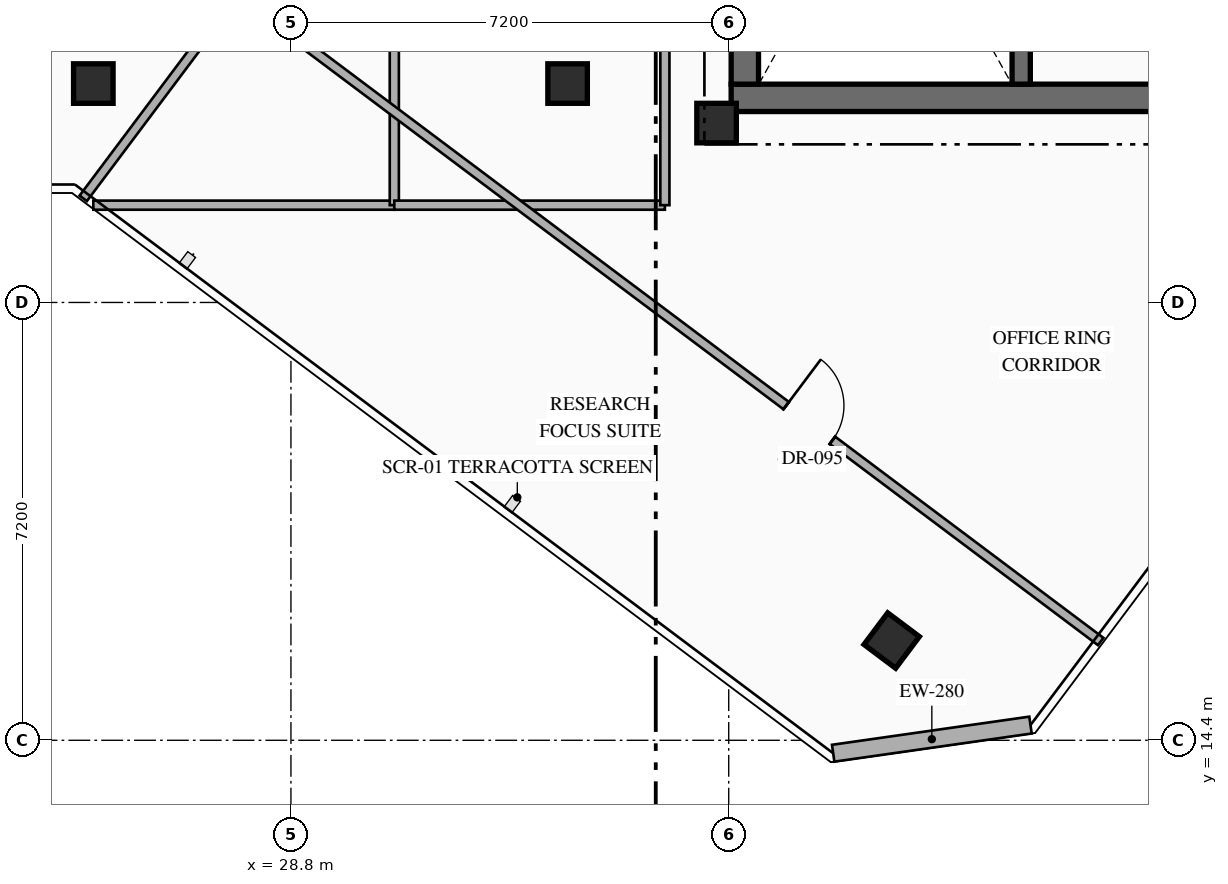
"""IFC4 building model, lengths in metres.
Left out: names, types, materials, properties, quantities, classifications, styles, units other than length and angle.
Written with IfcOpenShell. Run it as: python <this file> out.ifc"""

import sys

from ifc_helpers import new_model, si_unit, direction, frame, frame_2d, origin, origin_2d, place, context, subcontext, project, spatial, rectangle, hollow_rectangle, extrude, element, fill, save


model = new_model("IFC4")
c1 = context("Model", 3, precision=1e-05, world=origin(), true_north=direction((0.0, 1.0)))
c2 = subcontext(c1, "Body", "Model", "MODEL_VIEW")
j1 = project(units=[si_unit("LENGTHUNIT", "METRE"), si_unit("PLANEANGLEUNIT", "RADIAN")], contexts=[c1])
p1 = place(None, origin())
s1 = spatial("IfcSite", under=j1, at=p1, CompositionType="ELEMENT")
p2 = place(p1, origin())
s2 = spatial("IfcBuilding", under=s1, at=p2, CompositionType="ELEMENT")
p3 = place(p2, frame((0.0, 0.0, 253.95)))
s3 = spatial("IfcBuildingStorey", under=s2, at=p3, CompositionType="ELEMENT", Elevation=253.95)
p4 = place(p3, frame((36.04, 24.965, 0.0), z_axis=(0.0, 0.0, 1.0), x_axis=(1.0, 0.0, 0.0)))
e1 = element("IfcWall", 1, at=p4, inside=s3, PredefinedType="SHEAR", context=c2, shape_type="SweptSolid", body=[
    extrude(rectangle(XDim=7.46, YDim=0.45, at=frame_2d((3.73, 0.0))), origin(), (0.0, 0.0, 1.0), 3.6),
])
p5 = place(p3, frame((36.265, 25.19, 0.0), z_axis=(0.0, 0.0, 1.0), x_axis=(0.0, 1.0, 0.0)))
e2 = element("IfcWall", 2, at=p5, inside=s3, PredefinedType="SHEAR", context=c2, shape_type="SweptSolid", body=[
    extrude(rectangle(XDim=9.48, YDim=0.45, at=frame_2d((4.74, 0.0))), origin(), (0.0, 0.0, 1.0), 3.6),
])
p6 = place(p3, frame((40.81, 25.19, 0.0), z_axis=(0.0, 0.0, 1.0), x_axis=(0.0, 1.0, 0.0)))
e3 = element("IfcWall", 3, at=p6, inside=s3, PredefinedType="SHEAR", context=c2, shape_type="SweptSolid", body=[
    extrude(rectangle(XDim=9.48, YDim=0.3, at=frame_2d((4.74, 0.0))), origin(), (0.0, 0.0, 1.0), 3.6),
])
for number, where, z_axis, x_axis in (
    (4, (35.8, 24.55, 0.0), (0.0, 0.0, 1.0), (1.0, 0.0, 0.0)),
    (5, (25.55, 25.2, 0.0), (0.0, 0.0, 1.0), (1.0, 0.0, 0.0)),
    (6, (33.35, 25.2, 0.0), (0.0, 0.0, 1.0), (1.0, 0.0, 0.0)),
    (7, (38.68, 16.04, 0.0), (0.0, 0.0, 1.0), (0.8, -0.6, 0.0)),
):
    element("IfcColumn", number, at=place(p3, frame(where, z_axis=z_axis, x_axis=x_axis)), inside=s3, PredefinedType="COLUMN", context=c2, shape_type="SweptSolid", body=[
        extrude(hollow_rectangle(XDim=0.65, YDim=0.65, WallThickness=0.025, at=origin_2d()), origin(), (0.0, 0.0, 1.0), 3.6),
    ])
p7 = place(p3, frame((40.963, 14.65, 0.0), z_axis=(0.0, 0.0, 1.0), x_axis=(-0.989977778067, -0.141223223777, 0.0)))
e8 = element("IfcWall", 8, at=p7, inside=s3, PredefinedType="STANDARD", context=c2, shape_type="SweptSolid", body=[
    extrude(rectangle(XDim=3.278, YDim=0.28, at=frame_2d((1.639, 0.0))), origin(), (0.0, 0.0, 1.0), 3.35),
])
p8 = place(p3, frame((25.55, 23.2, 0.0), z_axis=(0.0, 0.0, 1.0), x_axis=(1.0, 0.0, 0.0)))
e9 = element("IfcWall", 9, at=p8, inside=s3, PredefinedType="PARTITIONING", context=c2, shape_type="SweptSolid", body=[
    extrude(rectangle(XDim=4.95, YDim=0.15, at=frame_2d((2.475, 0.0))), origin(), (0.0, 0.0, 1.0), 3.35),
])
p9 = place(p3, frame((30.5, 23.2, 0.0), z_axis=(0.0, 0.0, 1.0), x_axis=(0.0, 1.0, 0.0)))
e10 = element("IfcWall", 10, at=p9, inside=s3, PredefinedType="PARTITIONING", context=c2, shape_type="SweptSolid", body=[
    extrude(rectangle(XDim=7.15, YDim=0.15, at=frame_2d((3.575, 0.0))), origin(), (0.0, 0.0, 1.0), 3.35),
])
p10 = place(p3, frame((30.5, 23.2, 0.0), z_axis=(0.0, 0.0, 1.0), x_axis=(1.0, 0.0, 0.0)))
e11 = element("IfcWall", 11, at=p10, inside=s3, PredefinedType="PARTITIONING", context=c2, shape_type="SweptSolid", body=[
    extrude(rectangle(XDim=4.45, YDim=0.15, at=frame_2d((2.225, 0.0))), origin(), (0.0, 0.0, 1.0), 3.35),
])
p11 = place(p3, frame((34.95, 23.2, 0.0), z_axis=(0.0, 0.0, 1.0), x_axis=(0.0, 1.0, 0.0)))
e12 = element("IfcWall", 12, at=p11, inside=s3, PredefinedType="PARTITIONING", context=c2, shape_type="SweptSolid", body=[
    extrude(rectangle(XDim=7.15, YDim=0.15, at=frame_2d((3.575, 0.0))), origin(), (0.0, 0.0, 1.0), 3.35),
])
p12 = place(p3, frame((27.91, 26.68, 0.0), z_axis=(0.0, 0.0, 1.0), x_axis=(0.8, -0.6, 0.0)))
e13 = element("IfcWall", 13, at=p12, inside=s3, PredefinedType="PARTITIONING", context=c2, shape_type="SweptSolid", body=[
    extrude(rectangle(XDim=17.76, YDim=0.15, at=frame_2d((8.88, 0.0))), origin(), (0.0, 0.0, 1.0), 3.35),
])
p13 = place(p12, frame((11.294, 0.0, 0.0)))
e14 = element("IfcOpeningElement", 14, at=p13, cuts=e13, PredefinedType="OPENING", context=c2, shape_type="SweptSolid", body=[
    extrude(rectangle(XDim=0.95, YDim=2.15, at=frame_2d((0.475, 1.075))), frame((0.0, 0.085, 0.0), z_axis=(0.0, -1.0, 0.0), x_axis=(1.0, 0.0, 0.0)), (0.0, 0.0, 1.0), 0.17),
])
p14 = place(p3, frame((25.384, 23.312, 0.0), z_axis=(0.0, 0.0, 1.0), x_axis=(0.599990721155, 0.80000695905, 0.0)))
e15 = element("IfcWall", 15, at=p14, inside=s3, PredefinedType="PARTITIONING", context=c2, shape_type="SweptSolid", body=[
    extrude(rectangle(XDim=4.21, YDim=0.15, at=frame_2d((2.105, 0.0))), origin(), (0.0, 0.0, 1.0), 3.35),
])
p15 = place(p13, origin())
e16 = element("IfcDoor", 16, at=p15, inside=s3, OperationType="SINGLE_SWING_LEFT", PredefinedType="DOOR", context=c2, shape_type="SweptSolid", body=[
    extrude(rectangle(XDim=0.95, YDim=2.15, at=frame_2d((0.475, 1.075))), frame((0.0, 0.025, 0.0), z_axis=(0.0, -1.0, 0.0), x_axis=(1.0, 0.0, 0.0)), (0.0, 0.0, 1.0), 0.05),
])
fill(e14, e16)
save(model, sys.argv[1])
